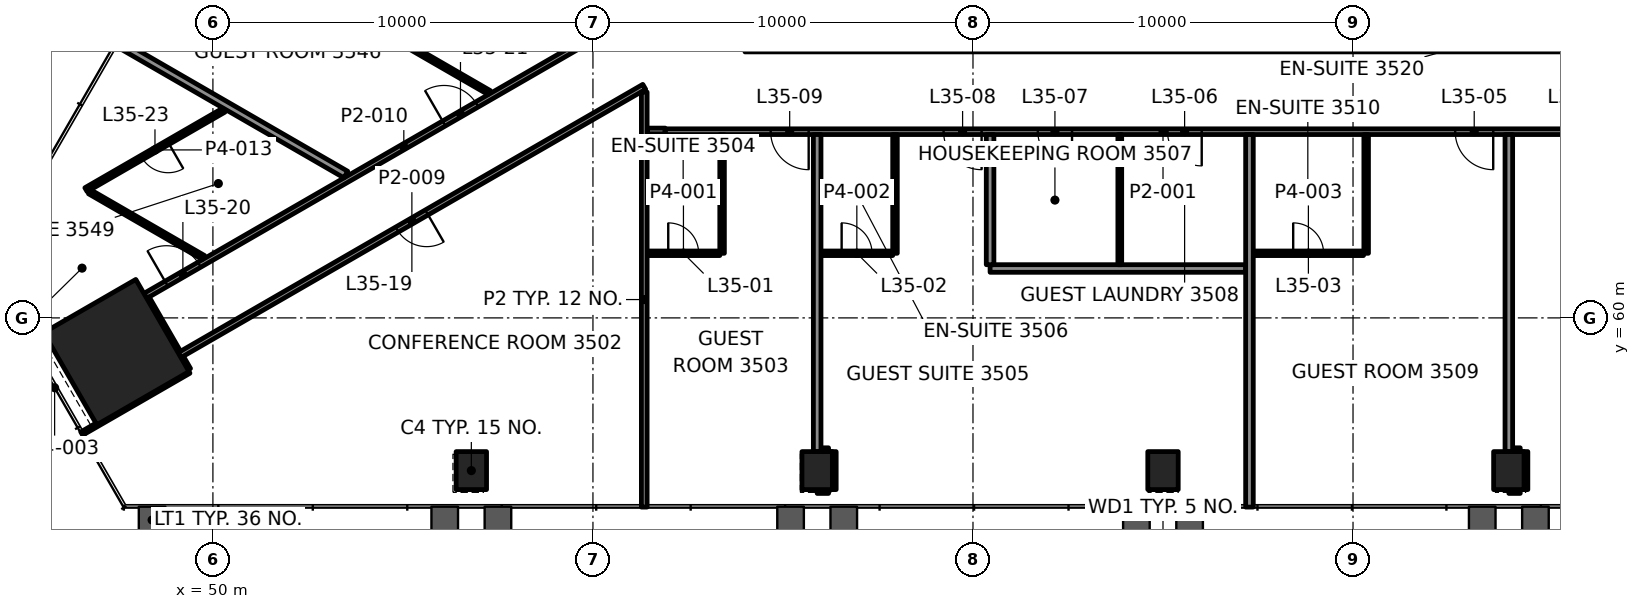
"""IFC4 building model, lengths in metres.
Left out: names, types, materials, properties, quantities, classifications, styles, units other than length and angle.
Written with IfcOpenShell. Run it as: python <this file> out.ifc"""

import sys

from ifc_helpers import new_model, si_unit, direction, frame, frame_2d, origin, origin_2d, place, context, subcontext, project, spatial, rectangle, hollow_rectangle, extrude, element, fill, save


model = new_model("IFC4")
c1 = context("Model", 3, precision=1e-05, world=origin(), true_north=direction((0.0, 1.0)))
c2 = subcontext(c1, "Body", "Model", "MODEL_VIEW")
j1 = project(units=[si_unit("LENGTHUNIT", "METRE"), si_unit("PLANEANGLEUNIT", "RADIAN")], contexts=[c1])
p1 = place(None, origin())
s1 = spatial("IfcSite", under=j1, at=p1, CompositionType="ELEMENT")
p2 = place(p1, origin())
s2 = spatial("IfcBuilding", under=s1, at=p2, CompositionType="ELEMENT")
p3 = place(p2, frame((0.0, 0.0, 155.8)))
s3 = spatial("IfcBuildingStorey", under=s2, at=p3, CompositionType="ELEMENT", Elevation=155.8)
p4 = place(p3, frame((47.459, 59.099, 0.0), z_axis=(0.0, 0.0, 1.0), x_axis=(0.5, -0.866025403784, 0.0)))
e1 = element("IfcColumn", 1, at=p4, inside=s3, PredefinedType="COLUMN", context=c2, shape_type="SweptSolid", body=[
    extrude(rectangle(XDim=2.8, YDim=2.8, at=origin_2d()), origin(), (0.0, 0.0, 1.0), 3.9),
])
for number, where, z_axis, x_axis in (
    (2, (56.8, 55.981, -0.0), (0.0, 0.0, 1.0), (1.0, 0.0, 0.0)),
    (3, (65.9, 55.981, -0.0), (0.0, 0.0, 1.0), (1.0, 0.0, 0.0)),
    (4, (75.0, 55.981, -0.0), (0.0, 0.0, 1.0), (1.0, 0.0, 0.0)),
    (5, (84.1, 55.981, -0.0), (0.0, 0.0, 1.0), (1.0, 0.0, 0.0)),
):
    element("IfcColumn", number, at=place(p3, frame(where, z_axis=z_axis, x_axis=x_axis)), inside=s3, PredefinedType="COLUMN", context=c2, shape_type="SweptSolid", body=[
        extrude(hollow_rectangle(XDim=0.8, YDim=1.0, WallThickness=0.05, at=origin_2d()), origin(), (0.0, 0.0, 1.0), 3.9),
    ])
p5 = place(p3, frame((65.9, 55.481, 0.0), z_axis=(0.0, 0.0, 1.0), x_axis=(1.0, 0.0, 0.0)))
e6 = element("IfcWall", 6, at=p5, inside=s3, PredefinedType="PARTITIONING", context=c2, shape_type="SweptSolid", body=[
    extrude(rectangle(XDim=0.3, YDim=0.2, at=frame_2d((0.15, 0.0))), origin(), (0.0, 0.0, 1.0), 3.1),
])
p6 = place(p3, frame((84.1, 55.481, 0.0), z_axis=(0.0, 0.0, 1.0), x_axis=(1.0, 0.0, 0.0)))
e7 = element("IfcWall", 7, at=p6, inside=s3, PredefinedType="PARTITIONING", context=c2, shape_type="SweptSolid", body=[
    extrude(rectangle(XDim=0.3, YDim=0.2, at=frame_2d((0.15, 0.0))), origin(), (0.0, 0.0, 1.0), 3.1),
])
p7 = place(p3, frame((66.0, 56.481, 0.0), z_axis=(0.0, 0.0, 1.0), x_axis=(1.0, 0.0, 0.0)))
e8 = element("IfcWall", 8, at=p7, inside=s3, PredefinedType="PARTITIONING", context=c2, shape_type="SweptSolid", body=[
    extrude(rectangle(XDim=0.199, YDim=0.2, at=frame_2d((0.1, 0.0))), origin(), (0.0, 0.0, 1.0), 3.1),
])
p8 = place(p3, frame((84.2, 56.481, 0.0), z_axis=(0.0, 0.0, 1.0), x_axis=(1.0, 0.0, 0.0)))
e9 = element("IfcWall", 9, at=p8, inside=s3, PredefinedType="PARTITIONING", context=c2, shape_type="SweptSolid", body=[
    extrude(rectangle(XDim=0.2, YDim=0.2, at=frame_2d((0.1, 0.0))), origin(), (0.0, 0.0, 1.0), 3.1),
])
p9 = place(p3, frame((70.45, 61.3, 0.0), z_axis=(0.0, 0.0, 1.0), x_axis=(1.0, 0.0, 0.0)))
e10 = element("IfcWall", 10, at=p9, inside=s3, PredefinedType="PARTITIONING", context=c2, shape_type="SweptSolid", body=[
    extrude(rectangle(XDim=6.725, YDim=0.2, at=frame_2d((3.363, 0.0))), origin(), (0.0, 0.0, 1.0), 3.1),
])
p10 = place(p3, frame((61.425, 61.7, 0.0), z_axis=(0.0, 0.0, 1.0), x_axis=(1.0, 0.0, 0.0)))
e11 = element("IfcWall", 11, at=p10, inside=s3, PredefinedType="PARTITIONING", context=c2, shape_type="SweptSolid", body=[
    extrude(rectangle(XDim=1.912, YDim=0.12, at=frame_2d((0.956, 0.0))), origin(), (0.0, 0.0, 1.0), 3.1),
])
p11 = place(p10, frame((0.556, 0.0, 0.0)))
e12 = element("IfcOpeningElement", 12, at=p11, cuts=e11, PredefinedType="OPENING", context=c2, shape_type="SweptSolid", body=[
    extrude(rectangle(XDim=0.8, YDim=2.1, at=frame_2d((0.4, 1.05))), frame((0.0, 0.07, 0.0), z_axis=(0.0, -1.0, 0.0), x_axis=(1.0, 0.0, 0.0)), (0.0, 0.0, 1.0), 0.14),
])
p12 = place(p3, frame((66.0, 61.7, 0.0), z_axis=(0.0, 0.0, 1.0), x_axis=(1.0, 0.0, 0.0)))
e13 = element("IfcWall", 13, at=p12, inside=s3, PredefinedType="PARTITIONING", context=c2, shape_type="SweptSolid", body=[
    extrude(rectangle(XDim=1.887, YDim=0.12, at=frame_2d((0.944, 0.0))), origin(), (0.0, 0.0, 1.0), 3.1),
])
p13 = place(p12, frame((0.544, 0.0, 0.0)))
e14 = element("IfcOpeningElement", 14, at=p13, cuts=e13, PredefinedType="OPENING", context=c2, shape_type="SweptSolid", body=[
    extrude(rectangle(XDim=0.8, YDim=2.1, at=frame_2d((0.4, 1.05))), frame((0.0, 0.07, 0.0), z_axis=(0.0, -1.0, 0.0), x_axis=(1.0, 0.0, 0.0)), (0.0, 0.0, 1.0), 0.14),
])
p14 = place(p3, frame((77.375, 61.7, 0.0), z_axis=(0.0, 0.0, 1.0), x_axis=(1.0, 0.0, 0.0)))
e15 = element("IfcWall", 15, at=p14, inside=s3, PredefinedType="PARTITIONING", context=c2, shape_type="SweptSolid", body=[
    extrude(rectangle(XDim=2.901, YDim=0.12, at=frame_2d((1.451, 0.0))), origin(), (0.0, 0.0, 1.0), 3.1),
])
p15 = place(p14, frame((1.051, 0.0, 0.0)))
e16 = element("IfcOpeningElement", 16, at=p15, cuts=e15, PredefinedType="OPENING", context=c2, shape_type="SweptSolid", body=[
    extrude(rectangle(XDim=0.8, YDim=2.1, at=frame_2d((0.4, 1.05))), frame((0.0, 0.07, 0.0), z_axis=(0.0, -1.0, 0.0), x_axis=(1.0, 0.0, 0.0)), (0.0, 0.0, 1.0), 0.14),
])
p16 = place(p3, frame((88.1, 64.9, 0.0), z_axis=(0.0, 0.0, 1.0), x_axis=(-1.0, 0.0, 0.0)))
e17 = element("IfcWall", 17, at=p16, inside=s3, PredefinedType="PARTITIONING", context=c2, shape_type="SweptSolid", body=[
    extrude(rectangle(XDim=26.2, YDim=0.15, at=frame_2d((13.1, 0.0))), origin(), (0.0, 0.0, 1.0), 3.1),
])
p17 = place(p16, frame((1.602, 0.0, 0.0)))
e18 = element("IfcOpeningElement", 18, at=p17, cuts=e17, PredefinedType="OPENING", context=c2, shape_type="SweptSolid", body=[
    extrude(rectangle(XDim=1.0, YDim=2.1, at=frame_2d((0.5, 1.05))), frame((0.0, 0.085, 0.0), z_axis=(0.0, -1.0, 0.0), x_axis=(1.0, 0.0, 0.0)), (0.0, 0.0, 1.0), 0.17),
])
p18 = place(p16, frame((4.411, 0.0, 0.0)))
e19 = element("IfcOpeningElement", 19, at=p18, cuts=e17, PredefinedType="OPENING", context=c2, shape_type="SweptSolid", body=[
    extrude(rectangle(XDim=1.0, YDim=2.1, at=frame_2d((0.5, 1.05))), frame((0.0, 0.085, 0.0), z_axis=(0.0, -1.0, 0.0), x_axis=(1.0, 0.0, 0.0)), (0.0, 0.0, 1.0), 0.17),
])
p19 = place(p16, frame((12.081, 0.0, 0.0)))
e20 = element("IfcOpeningElement", 20, at=p19, cuts=e17, PredefinedType="OPENING", context=c2, shape_type="SweptSolid", body=[
    extrude(rectangle(XDim=0.9, YDim=2.1, at=frame_2d((0.45, 1.05))), frame((0.0, 0.085, 0.0), z_axis=(0.0, -1.0, 0.0), x_axis=(1.0, 0.0, 0.0)), (0.0, 0.0, 1.0), 0.17),
])
p20 = place(p16, frame((15.494, 0.0, 0.0)))
e21 = element("IfcOpeningElement", 21, at=p20, cuts=e17, PredefinedType="OPENING", context=c2, shape_type="SweptSolid", body=[
    extrude(rectangle(XDim=0.9, YDim=2.1, at=frame_2d((0.45, 1.05))), frame((0.0, 0.085, 0.0), z_axis=(0.0, -1.0, 0.0), x_axis=(1.0, 0.0, 0.0)), (0.0, 0.0, 1.0), 0.17),
])
p21 = place(p16, frame((17.873, 0.0, 0.0)))
e22 = element("IfcOpeningElement", 22, at=p21, cuts=e17, PredefinedType="OPENING", context=c2, shape_type="SweptSolid", body=[
    extrude(rectangle(XDim=1.0, YDim=2.1, at=frame_2d((0.5, 1.05))), frame((0.0, 0.085, 0.0), z_axis=(0.0, -1.0, 0.0), x_axis=(1.0, 0.0, 0.0)), (0.0, 0.0, 1.0), 0.17),
])
p22 = place(p16, frame((22.423, 0.0, 0.0)))
e23 = element("IfcOpeningElement", 23, at=p22, cuts=e17, PredefinedType="OPENING", context=c2, shape_type="SweptSolid", body=[
    extrude(rectangle(XDim=1.0, YDim=2.1, at=frame_2d((0.5, 1.05))), frame((0.0, 0.085, 0.0), z_axis=(0.0, -1.0, 0.0), x_axis=(1.0, 0.0, 0.0)), (0.0, 0.0, 1.0), 0.17),
])
p23 = place(p3, frame((61.425, 64.919, 0.0), z_axis=(0.0, 0.0, 1.0), x_axis=(1.0, 0.0, 0.0)))
e24 = element("IfcWall", 24, at=p23, inside=s3, PredefinedType="PARTITIONING", context=c2, shape_type="SweptSolid", body=[
    extrude(rectangle(XDim=0.475, YDim=0.15, at=frame_2d((0.237, 0.0))), origin(), (0.0, 0.0, 1.0), 3.1),
])
p24 = place(p3, frame((46.548, 56.957, 0.0), z_axis=(0.0, 0.0, 1.0), x_axis=(0.866035906198, 0.499981808845, 0.0)))
e25 = element("IfcWall", 25, at=p24, inside=s3, PredefinedType="PARTITIONING", context=c2, shape_type="SweptSolid", body=[
    extrude(rectangle(XDim=3.259, YDim=0.1, at=frame_2d((1.63, 0.0))), origin(), (0.0, 0.0, 1.0), 3.1),
])
p25 = place(p3, frame((61.35, 66.08, 0.0), z_axis=(0.0, 0.0, 1.0), x_axis=(-0.86602031485, -0.50000881419, 0.0)))
e26 = element("IfcWall", 26, at=p25, inside=s3, PredefinedType="PARTITIONING", context=c2, shape_type="SweptSolid", body=[
    extrude(rectangle(XDim=14.12, YDim=0.15, at=frame_2d((7.06, 0.0))), origin(), (0.0, 0.0, 1.0), 2.947),
])
p26 = place(p25, frame((6.61, 0.0, 0.0)))
e27 = element("IfcOpeningElement", 27, at=p26, cuts=e26, PredefinedType="OPENING", context=c2, shape_type="SweptSolid", body=[
    extrude(rectangle(XDim=0.9, YDim=2.1, at=frame_2d((0.45, 1.05))), frame((0.0, 0.085, 0.0), z_axis=(0.0, -1.0, 0.0), x_axis=(1.0, 0.0, 0.0)), (0.0, 0.0, 1.0), 0.17),
])
p27 = place(p3, frame((48.222, 60.579, 0.0), z_axis=(0.0, 0.0, 1.0), x_axis=(0.866027958894, 0.499995574394, 0.0)))
e28 = element("IfcWall", 28, at=p27, inside=s3, PredefinedType="PARTITIONING", context=c2, shape_type="SweptSolid", body=[
    extrude(rectangle(XDim=15.708, YDim=0.15, at=frame_2d((7.854, 0.0))), origin(), (0.0, 0.0, 1.0), 3.1),
])
p28 = place(p27, frame((0.641, 0.0, 0.0)))
e29 = element("IfcOpeningElement", 29, at=p28, cuts=e28, PredefinedType="OPENING", context=c2, shape_type="SweptSolid", body=[
    extrude(rectangle(XDim=1.0, YDim=2.1, at=frame_2d((0.5, 1.05))), frame((0.0, 0.085, 0.0), z_axis=(0.0, -1.0, 0.0), x_axis=(1.0, 0.0, 0.0)), (0.0, 0.0, 1.0), 0.17),
])
p29 = place(p27, frame((9.075, 0.0, 0.0)))
e30 = element("IfcOpeningElement", 30, at=p29, cuts=e28, PredefinedType="OPENING", context=c2, shape_type="SweptSolid", body=[
    extrude(rectangle(XDim=1.0, YDim=2.1, at=frame_2d((0.5, 1.05))), frame((0.0, 0.085, 0.0), z_axis=(0.0, -1.0, 0.0), x_axis=(1.0, 0.0, 0.0)), (0.0, 0.0, 1.0), 0.17),
])
p30 = place(p27, frame((14.449, 0.0, 0.0)))
e31 = element("IfcOpeningElement", 31, at=p30, cuts=e28, PredefinedType="OPENING", context=c2, shape_type="SweptSolid", body=[
    extrude(rectangle(XDim=1.0, YDim=2.1, at=frame_2d((0.5, 1.05))), frame((0.0, 0.085, 0.0), z_axis=(0.0, -1.0, 0.0), x_axis=(1.0, 0.0, 0.0)), (0.0, 0.0, 1.0), 0.17),
])
p31 = place(p3, frame((50.29, 65.468, 0.0), z_axis=(0.0, 0.0, 1.0), x_axis=(-0.866011945653, -0.500023309443, 0.0)))
e32 = element("IfcWall", 32, at=p31, inside=s3, PredefinedType="PARTITIONING", context=c2, shape_type="SweptSolid", body=[
    extrude(rectangle(XDim=4.191, YDim=0.12, at=frame_2d((2.096, 0.0))), origin(), (0.0, 0.0, 1.0), 3.1),
])
p32 = place(p31, frame((1.696, 0.0, 0.0)))
e33 = element("IfcOpeningElement", 33, at=p32, cuts=e32, PredefinedType="OPENING", context=c2, shape_type="SweptSolid", body=[
    extrude(rectangle(XDim=0.8, YDim=2.1, at=frame_2d((0.4, 1.05))), frame((0.0, 0.07, 0.0), z_axis=(0.0, -1.0, 0.0), x_axis=(1.0, 0.0, 0.0)), (0.0, 0.0, 1.0), 0.14),
])
p33 = place(p3, frame((84.5, 55.481, 0.0), z_axis=(0.0, 0.0, 1.0), x_axis=(0.0, 1.0, 0.0)))
e34 = element("IfcWall", 34, at=p33, inside=s3, PredefinedType="PARTITIONING", context=c2, shape_type="SweptSolid", body=[
    extrude(rectangle(XDim=1.0, YDim=0.2, at=frame_2d((0.5, 0.0))), origin(), (0.0, 0.0, 1.0), 2.865),
])
p34 = place(p3, frame((84.1, 56.481, 0.0), z_axis=(0.0, 0.0, 1.0), x_axis=(0.0, 1.0, 0.0)))
e35 = element("IfcWall", 35, at=p34, inside=s3, PredefinedType="PARTITIONING", context=c2, shape_type="SweptSolid", body=[
    extrude(rectangle(XDim=8.344, YDim=0.2, at=frame_2d((4.172, 0.0))), origin(), (0.0, 0.0, 1.0), 3.1),
])
p35 = place(p3, frame((80.346, 61.7, 0.0), z_axis=(0.0, 0.0, 1.0), x_axis=(0.0, 1.0, 0.0)))
e36 = element("IfcWall", 36, at=p35, inside=s3, PredefinedType="PARTITIONING", context=c2, shape_type="SweptSolid", body=[
    extrude(rectangle(XDim=3.125, YDim=0.12, at=frame_2d((1.562, 0.0))), origin(), (0.0, 0.0, 1.0), 3.1),
])
p36 = place(p3, frame((77.275, 55.021, 0.0), z_axis=(0.0, 0.0, 1.0), x_axis=(0.0, 1.0, 0.0)))
e37 = element("IfcWall", 37, at=p36, inside=s3, PredefinedType="PARTITIONING", context=c2, shape_type="SweptSolid", body=[
    extrude(rectangle(XDim=9.803, YDim=0.2, at=frame_2d((4.902, 0.0))), origin(), (0.0, 0.0, 1.0), 2.865),
])
p37 = place(p3, frame((73.863, 61.4, 0.0), z_axis=(0.0, 0.0, 1.0), x_axis=(0.0, 1.0, 0.0)))
e38 = element("IfcWall", 38, at=p37, inside=s3, PredefinedType="PARTITIONING", context=c2, shape_type="SweptSolid", body=[
    extrude(rectangle(XDim=3.425, YDim=0.1, at=frame_2d((1.712, 0.0))), origin(), (0.0, 0.0, 1.0), 3.1),
])
p38 = place(p3, frame((70.45, 61.4, 0.0), z_axis=(0.0, 0.0, 1.0), x_axis=(0.0, 1.0, 0.0)))
e39 = element("IfcWall", 39, at=p38, inside=s3, PredefinedType="PARTITIONING", context=c2, shape_type="SweptSolid", body=[
    extrude(rectangle(XDim=3.425, YDim=0.2, at=frame_2d((1.712, 0.0))), origin(), (0.0, 0.0, 1.0), 3.1),
])
p39 = place(p3, frame((67.948, 61.7, 0.0), z_axis=(0.0, 0.0, 1.0), x_axis=(0.0, 1.0, 0.0)))
e40 = element("IfcWall", 40, at=p39, inside=s3, PredefinedType="PARTITIONING", context=c2, shape_type="SweptSolid", body=[
    extrude(rectangle(XDim=3.125, YDim=0.12, at=frame_2d((1.562, 0.0))), origin(), (0.0, 0.0, 1.0), 3.1),
])
p40 = place(p3, frame((66.3, 55.482, 0.0), z_axis=(0.0, 0.0, 1.0), x_axis=(0.0, 1.0, 0.0)))
e41 = element("IfcWall", 41, at=p40, inside=s3, PredefinedType="PARTITIONING", context=c2, shape_type="SweptSolid", body=[
    extrude(rectangle(XDim=0.999, YDim=0.2, at=frame_2d((0.5, 0.0))), origin(), (0.0, 0.0, 1.0), 2.865),
])
p41 = place(p3, frame((65.9, 56.481, 0.0), z_axis=(0.0, 0.0, 1.0), x_axis=(0.0, 1.0, 0.0)))
e42 = element("IfcWall", 42, at=p41, inside=s3, PredefinedType="PARTITIONING", context=c2, shape_type="SweptSolid", body=[
    extrude(rectangle(XDim=8.344, YDim=0.2, at=frame_2d((4.172, 0.0))), origin(), (0.0, 0.0, 1.0), 3.1),
])
p42 = place(p3, frame((63.398, 61.7, 0.0), z_axis=(0.0, 0.0, 1.0), x_axis=(0.0, 1.0, 0.0)))
e43 = element("IfcWall", 43, at=p42, inside=s3, PredefinedType="PARTITIONING", context=c2, shape_type="SweptSolid", body=[
    extrude(rectangle(XDim=3.125, YDim=0.12, at=frame_2d((1.562, 0.0))), origin(), (0.0, 0.0, 1.0), 3.1),
])
p43 = place(p3, frame((61.35, 55.021, 0.0), z_axis=(0.0, 0.0, 1.0), x_axis=(0.0, 1.0, 0.0)))
e44 = element("IfcWall", 44, at=p43, inside=s3, PredefinedType="PARTITIONING", context=c2, shape_type="SweptSolid", body=[
    extrude(rectangle(XDim=10.922, YDim=0.15, at=frame_2d((5.461, 0.0))), origin(), (0.0, 0.0, 1.0), 2.865),
])
p44 = place(p3, frame((49.346, 58.63, 0.0), z_axis=(0.0, 0.0, 1.0), x_axis=(-0.499854089722, 0.866109628736, 0.0)))
e45 = element("IfcWall", 45, at=p44, inside=s3, PredefinedType="PARTITIONING", context=c2, shape_type="SweptSolid", body=[
    extrude(rectangle(XDim=0.375, YDim=0.15, at=frame_2d((0.187, 0.0))), origin(), (0.0, 0.0, 1.0), 3.1),
])
p45 = place(p3, frame((57.269, 65.929, 0.0), z_axis=(0.0, 0.0, 1.0), x_axis=(-0.866028357664, 0.499994883695, 0.0)))
e46 = element("IfcWall", 46, at=p45, inside=s3, PredefinedType="PARTITIONING", context=c2, shape_type="SweptSolid", body=[
    extrude(rectangle(XDim=3.568, YDim=0.12, at=frame_2d((1.784, 0.0))), origin(), (0.0, 0.0, 1.0), 3.1),
])
p46 = place(p3, frame((53.498, 63.772, 0.0), z_axis=(0.0, 0.0, 1.0), x_axis=(-0.866014709899, 0.500018521895, 0.0)))
e47 = element("IfcWall", 47, at=p46, inside=s3, PredefinedType="PARTITIONING", context=c2, shape_type="SweptSolid", body=[
    extrude(rectangle(XDim=6.971, YDim=0.2, at=frame_2d((3.486, 0.0))), origin(), (0.0, 0.0, 1.0), 3.1),
])
p47 = place(p3, frame((49.751, 61.589, 0.0), z_axis=(0.0, 0.0, 1.0), x_axis=(-0.865997524453, 0.50004828531, 0.0)))
e48 = element("IfcWall", 48, at=p47, inside=s3, PredefinedType="PARTITIONING", context=c2, shape_type="SweptSolid", body=[
    extrude(rectangle(XDim=3.459, YDim=0.12, at=frame_2d((1.729, 0.0))), origin(), (0.0, 0.0, 1.0), 3.1),
])
p48 = place(p3, frame((49.084, 59.085, 0.0), z_axis=(0.0, 0.0, 1.0), x_axis=(-0.499991515992, 0.866030301974, 0.0)))
e49 = element("IfcWall", 49, at=p48, inside=s3, PredefinedType="PARTITIONING", context=c2, shape_type="SweptSolid", body=[
    extrude(rectangle(XDim=1.649, YDim=0.15, at=frame_2d((0.825, 0.0))), origin(), (0.0, 0.0, 1.0), 2.947),
])
p49 = place(p11, origin())
e50 = element("IfcDoor", 50, at=p49, inside=s3, OperationType="SINGLE_SWING_LEFT", PredefinedType="DOOR", context=c2, shape_type="SweptSolid", body=[
    extrude(rectangle(XDim=0.8, YDim=2.1, at=frame_2d((0.4, 1.05))), frame((0.0, 0.025, 0.0), z_axis=(0.0, -1.0, 0.0), x_axis=(1.0, 0.0, 0.0)), (0.0, 0.0, 1.0), 0.05),
])
fill(e12, e50)
p50 = place(p13, origin())
e51 = element("IfcDoor", 51, at=p50, inside=s3, OperationType="SINGLE_SWING_LEFT", PredefinedType="DOOR", context=c2, shape_type="SweptSolid", body=[
    extrude(rectangle(XDim=0.8, YDim=2.1, at=frame_2d((0.4, 1.05))), frame((0.0, 0.025, 0.0), z_axis=(0.0, -1.0, 0.0), x_axis=(1.0, 0.0, 0.0)), (0.0, 0.0, 1.0), 0.05),
])
fill(e14, e51)
p51 = place(p15, origin())
e52 = element("IfcDoor", 52, at=p51, inside=s3, OperationType="SINGLE_SWING_LEFT", PredefinedType="DOOR", context=c2, shape_type="SweptSolid", body=[
    extrude(rectangle(XDim=0.8, YDim=2.1, at=frame_2d((0.4, 1.05))), frame((0.0, 0.025, 0.0), z_axis=(0.0, -1.0, 0.0), x_axis=(1.0, 0.0, 0.0)), (0.0, 0.0, 1.0), 0.05),
])
fill(e16, e52)
p52 = place(p18, origin())
e53 = element("IfcDoor", 53, at=p52, inside=s3, OperationType="SINGLE_SWING_LEFT", PredefinedType="DOOR", context=c2, shape_type="SweptSolid", body=[
    extrude(rectangle(XDim=1.0, YDim=2.1, at=frame_2d((0.5, 1.05))), frame((0.0, 0.025, 0.0), z_axis=(0.0, -1.0, 0.0), x_axis=(1.0, 0.0, 0.0)), (0.0, 0.0, 1.0), 0.05),
])
fill(e19, e53)
p53 = place(p19, origin())
e54 = element("IfcDoor", 54, at=p53, inside=s3, OperationType="SINGLE_SWING_RIGHT", PredefinedType="DOOR", context=c2, shape_type="SweptSolid", body=[
    extrude(rectangle(XDim=0.9, YDim=2.1, at=frame_2d((0.45, 1.05))), frame((0.0, 0.025, 0.0), z_axis=(0.0, -1.0, 0.0), x_axis=(1.0, 0.0, 0.0)), (0.0, 0.0, 1.0), 0.05),
])
fill(e20, e54)
p54 = place(p20, origin())
e55 = element("IfcDoor", 55, at=p54, inside=s3, OperationType="SINGLE_SWING_LEFT", PredefinedType="DOOR", context=c2, shape_type="SweptSolid", body=[
    extrude(rectangle(XDim=0.9, YDim=2.1, at=frame_2d((0.45, 1.05))), frame((0.0, 0.025, 0.0), z_axis=(0.0, -1.0, 0.0), x_axis=(1.0, 0.0, 0.0)), (0.0, 0.0, 1.0), 0.05),
])
fill(e21, e55)
p55 = place(p21, origin())
e56 = element("IfcDoor", 56, at=p55, inside=s3, OperationType="SINGLE_SWING_LEFT", PredefinedType="DOOR", context=c2, shape_type="SweptSolid", body=[
    extrude(rectangle(XDim=1.0, YDim=2.1, at=frame_2d((0.5, 1.05))), frame((0.0, 0.025, 0.0), z_axis=(0.0, -1.0, 0.0), x_axis=(1.0, 0.0, 0.0)), (0.0, 0.0, 1.0), 0.05),
])
fill(e22, e56)
p56 = place(p22, origin())
e57 = element("IfcDoor", 57, at=p56, inside=s3, OperationType="SINGLE_SWING_LEFT", PredefinedType="DOOR", context=c2, shape_type="SweptSolid", body=[
    extrude(rectangle(XDim=1.0, YDim=2.1, at=frame_2d((0.5, 1.05))), frame((0.0, 0.025, 0.0), z_axis=(0.0, -1.0, 0.0), x_axis=(1.0, 0.0, 0.0)), (0.0, 0.0, 1.0), 0.05),
])
fill(e23, e57)
p57 = place(p26, origin())
e58 = element("IfcDoor", 58, at=p57, inside=s3, OperationType="SINGLE_SWING_RIGHT", PredefinedType="DOOR", context=c2, shape_type="SweptSolid", body=[
    extrude(rectangle(XDim=0.9, YDim=2.1, at=frame_2d((0.45, 1.05))), frame((0.0, 0.025, 0.0), z_axis=(0.0, -1.0, 0.0), x_axis=(1.0, 0.0, 0.0)), (0.0, 0.0, 1.0), 0.05),
])
fill(e27, e58)
p58 = place(p28, origin())
e59 = element("IfcDoor", 59, at=p58, inside=s3, OperationType="SINGLE_SWING_LEFT", PredefinedType="DOOR", context=c2, shape_type="SweptSolid", body=[
    extrude(rectangle(XDim=1.0, YDim=2.1, at=frame_2d((0.5, 1.05))), frame((0.0, 0.025, 0.0), z_axis=(0.0, -1.0, 0.0), x_axis=(1.0, 0.0, 0.0)), (0.0, 0.0, 1.0), 0.05),
])
fill(e29, e59)
p59 = place(p29, origin())
e60 = element("IfcDoor", 60, at=p59, inside=s3, OperationType="SINGLE_SWING_LEFT", PredefinedType="DOOR", context=c2, shape_type="SweptSolid", body=[
    extrude(rectangle(XDim=1.0, YDim=2.1, at=frame_2d((0.5, 1.05))), frame((0.0, 0.025, 0.0), z_axis=(0.0, -1.0, 0.0), x_axis=(1.0, 0.0, 0.0)), (0.0, 0.0, 1.0), 0.05),
])
fill(e30, e60)
p60 = place(p32, origin())
e61 = element("IfcDoor", 61, at=p60, inside=s3, OperationType="SINGLE_SWING_LEFT", PredefinedType="DOOR", context=c2, shape_type="SweptSolid", body=[
    extrude(rectangle(XDim=0.8, YDim=2.1, at=frame_2d((0.4, 1.05))), frame((0.0, 0.025, 0.0), z_axis=(0.0, -1.0, 0.0), x_axis=(1.0, 0.0, 0.0)), (0.0, 0.0, 1.0), 0.05),
])
fill(e33, e61)
p61 = place(p3, origin())
p62 = place(p61, frame((50.735, 55.006, 0.15), z_axis=(0.0, 0.0, 1.0), x_axis=(1.0, 0.0, 0.0)))
p63 = place(p62, origin())
e62 = element("IfcWindow", 62, at=p63, inside=s3, PartitioningType="SINGLE_PANEL", PredefinedType="WINDOW", context=c2, shape_type="SweptSolid", body=[
    extrude(rectangle(XDim=2.958, YDim=3.55, at=frame_2d((1.479, 1.775))), frame((0.0, 0.03, 0.0), z_axis=(0.0, -1.0, 0.0), x_axis=(1.0, 0.0, 0.0)), (0.0, 0.0, 1.0), 0.06),
])
save(model, sys.argv[1])
